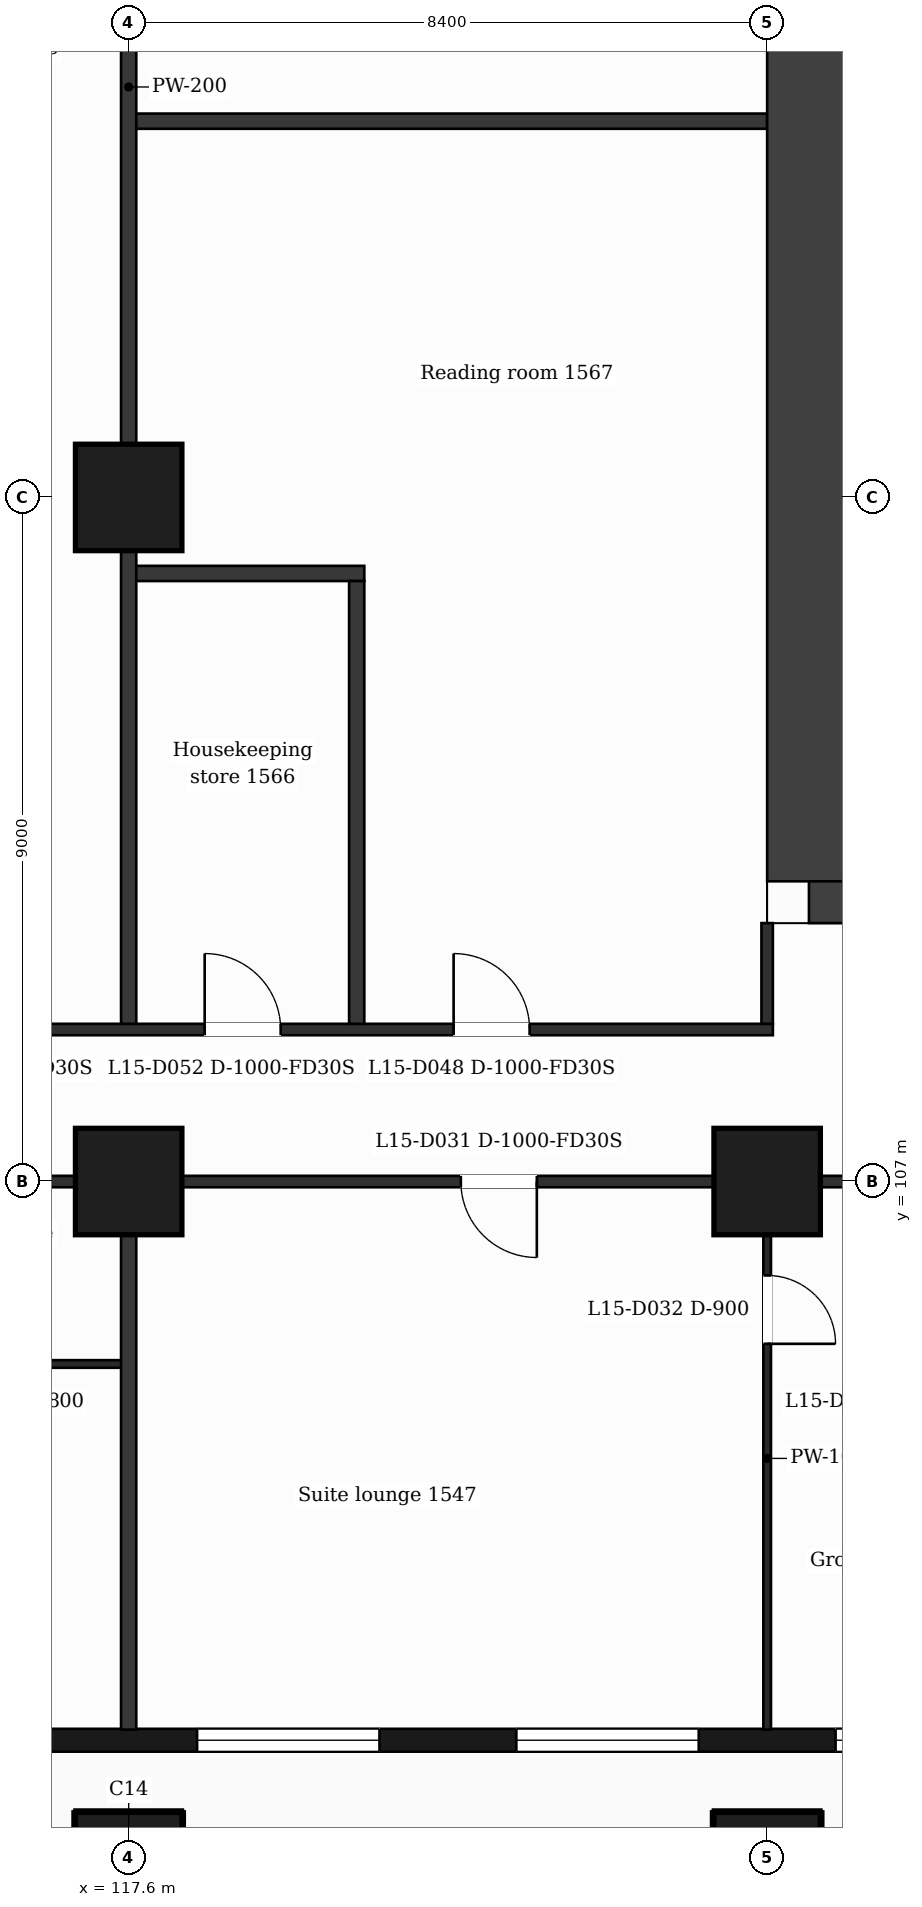
"""IFC4 building model, lengths in metres.
Left out: names, types, materials, properties, quantities, classifications, styles, units other than length and angle.
Written with IfcOpenShell. Run it as: python <this file> out.ifc"""

import sys

from ifc_helpers import new_model, si_unit, direction, frame, frame_2d, origin, origin_2d, place, context, subcontext, project, spatial, rectangle, extrude, element, fill, save


model = new_model("IFC4")
c1 = context("Model", 3, precision=1e-05, world=origin(), true_north=direction((0.0, 1.0)))
c2 = subcontext(c1, "Body", "Model", "MODEL_VIEW")
j1 = project(units=[si_unit("LENGTHUNIT", "METRE"), si_unit("PLANEANGLEUNIT", "RADIAN")], contexts=[c1])
p1 = place(None, origin())
s1 = spatial("IfcSite", under=j1, at=p1, CompositionType="ELEMENT")
p2 = place(p1, origin())
s2 = spatial("IfcBuilding", under=s1, at=p2, CompositionType="ELEMENT")
p3 = place(p2, frame((0.0, 0.0, 70.5)))
s3 = spatial("IfcBuildingStorey", under=s2, at=p3, CompositionType="ELEMENT", Elevation=70.5)
p4 = place(p3, frame((140.502, 110.95, 0.0), z_axis=(0.0, 0.0, 1.0), x_axis=(-1.0, 0.0, 0.0)))
e1 = element("IfcWall", 1, at=p4, inside=s3, PredefinedType="SHEAR", context=c2, shape_type="SweptSolid", body=[
    extrude(rectangle(XDim=13.952, YDim=1.1, at=frame_2d((6.976, 0.0))), origin(), (0.0, 0.0, 1.0), 3.5),
])
p5 = place(p4, frame((6.804, 0.0, 0.0)))
e2 = element("IfcOpeningElement", 2, at=p5, cuts=e1, PredefinedType="OPENING", context=c2, shape_type="SweptSolid", body=[
    extrude(rectangle(XDim=1.4, YDim=2.1, at=frame_2d((0.7, 1.05))), frame((0.0, 0.56, 0.0), z_axis=(0.0, -1.0, 0.0), x_axis=(1.0, 0.0, 0.0)), (0.0, 0.0, 1.0), 1.12),
])
p6 = place(p3, frame((126.55, 110.95, 0.0), z_axis=(0.0, 0.0, 1.0), x_axis=(0.0, 1.0, 0.0)))
e3 = element("IfcWall", 3, at=p6, inside=s3, PredefinedType="SHEAR", context=c2, shape_type="SweptSolid", body=[
    extrude(rectangle(XDim=20.9, YDim=1.1, at=frame_2d((10.45, 0.0))), origin(), (0.0, 0.0, 1.0), 3.5),
])
for number, where, z_axis, x_axis in (
    (4, (117.6, 98.0, 0.0), (0.0, 0.0, 1.0), (1.0, 0.0, 0.0)),
    (5, (126.0, 98.0, 0.0), (0.0, 0.0, 1.0), (1.0, 0.0, 0.0)),
    (6, (117.6, 107.0, 0.0), (0.0, 0.0, 1.0), (1.0, 0.0, 0.0)),
    (7, (126.0, 107.0, 0.0), (0.0, 0.0, 1.0), (1.0, 0.0, 0.0)),
    (8, (117.6, 116.0, 0.0), (0.0, 0.0, 1.0), (1.0, 0.0, 0.0)),
):
    element("IfcColumn", number, at=place(p3, frame(where, z_axis=z_axis, x_axis=x_axis)), inside=s3, PredefinedType="COLUMN", context=c2, shape_type="SweptSolid", body=[
        extrude(rectangle(XDim=1.4, YDim=1.4, at=origin_2d()), origin(), (0.0, 0.0, 1.0), 3.5),
    ])
p7 = place(p3, frame((89.85, 99.65, 0.0), z_axis=(0.0, 0.0, 1.0), x_axis=(1.0, 0.0, 0.0)))
e9 = element("IfcWall", 9, at=p7, inside=s3, PredefinedType="SOLIDWALL", context=c2, shape_type="SweptSolid", body=[
    extrude(rectangle(XDim=47.25, YDim=0.3, at=frame_2d((23.625, 0.0))), origin(), (0.0, 0.0, 1.0), 3.18),
])
p8 = place(p7, frame((0.725, 0.0, 0.9)))
e10 = element("IfcOpeningElement", 10, at=p8, cuts=e9, PredefinedType="OPENING", context=c2, shape_type="SweptSolid", body=[
    extrude(rectangle(XDim=1.2, YDim=2.1, at=frame_2d((0.6, 1.05))), frame((0.0, 0.16, 0.0), z_axis=(0.0, -1.0, 0.0), x_axis=(1.0, 0.0, 0.0)), (0.0, 0.0, 1.0), 0.32),
])
p9 = place(p7, frame((3.45, 0.0, 0.9)))
e11 = element("IfcOpeningElement", 11, at=p9, cuts=e9, PredefinedType="OPENING", context=c2, shape_type="SweptSolid", body=[
    extrude(rectangle(XDim=2.4, YDim=2.1, at=frame_2d((1.2, 1.05))), frame((0.0, 0.16, 0.0), z_axis=(0.0, -1.0, 0.0), x_axis=(1.0, 0.0, 0.0)), (0.0, 0.0, 1.0), 0.32),
])
p10 = place(p7, frame((7.35, 0.0, 0.0)))
e12 = element("IfcOpeningElement", 12, at=p10, cuts=e9, PredefinedType="OPENING", context=c2, shape_type="SweptSolid", body=[
    extrude(rectangle(XDim=1.2, YDim=2.4, at=frame_2d((0.6, 1.2))), frame((0.0, 0.16, 0.0), z_axis=(0.0, -1.0, 0.0), x_axis=(1.0, 0.0, 0.0)), (0.0, 0.0, 1.0), 0.32),
])
p11 = place(p7, frame((9.15, 0.0, 0.9)))
e13 = element("IfcOpeningElement", 13, at=p11, cuts=e9, PredefinedType="OPENING", context=c2, shape_type="SweptSolid", body=[
    extrude(rectangle(XDim=1.2, YDim=2.1, at=frame_2d((0.6, 1.05))), frame((0.0, 0.16, 0.0), z_axis=(0.0, -1.0, 0.0), x_axis=(1.0, 0.0, 0.0)), (0.0, 0.0, 1.0), 0.32),
])
p12 = place(p7, frame((11.85, 0.0, 0.9)))
e14 = element("IfcOpeningElement", 14, at=p12, cuts=e9, PredefinedType="OPENING", context=c2, shape_type="SweptSolid", body=[
    extrude(rectangle(XDim=2.4, YDim=2.1, at=frame_2d((1.2, 1.05))), frame((0.0, 0.16, 0.0), z_axis=(0.0, -1.0, 0.0), x_axis=(1.0, 0.0, 0.0)), (0.0, 0.0, 1.0), 0.32),
])
p13 = place(p7, frame((16.05, 0.0, 0.9)))
e15 = element("IfcOpeningElement", 15, at=p13, cuts=e9, PredefinedType="OPENING", context=c2, shape_type="SweptSolid", body=[
    extrude(rectangle(XDim=2.4, YDim=2.1, at=frame_2d((1.2, 1.05))), frame((0.0, 0.16, 0.0), z_axis=(0.0, -1.0, 0.0), x_axis=(1.0, 0.0, 0.0)), (0.0, 0.0, 1.0), 0.32),
])
p14 = place(p7, frame((20.85, 0.0, 0.9)))
e16 = element("IfcOpeningElement", 16, at=p14, cuts=e9, PredefinedType="OPENING", context=c2, shape_type="SweptSolid", body=[
    extrude(rectangle(XDim=1.2, YDim=2.1, at=frame_2d((0.6, 1.05))), frame((0.0, 0.16, 0.0), z_axis=(0.0, -1.0, 0.0), x_axis=(1.0, 0.0, 0.0)), (0.0, 0.0, 1.0), 0.32),
])
p15 = place(p7, frame((25.05, 0.0, 0.9)))
e17 = element("IfcOpeningElement", 17, at=p15, cuts=e9, PredefinedType="OPENING", context=c2, shape_type="SweptSolid", body=[
    extrude(rectangle(XDim=1.2, YDim=2.1, at=frame_2d((0.6, 1.05))), frame((0.0, 0.16, 0.0), z_axis=(0.0, -1.0, 0.0), x_axis=(1.0, 0.0, 0.0)), (0.0, 0.0, 1.0), 0.32),
])
p16 = place(p7, frame((28.65, 0.0, 0.9)))
e18 = element("IfcOpeningElement", 18, at=p16, cuts=e9, PredefinedType="OPENING", context=c2, shape_type="SweptSolid", body=[
    extrude(rectangle(XDim=2.4, YDim=2.1, at=frame_2d((1.2, 1.05))), frame((0.0, 0.16, 0.0), z_axis=(0.0, -1.0, 0.0), x_axis=(1.0, 0.0, 0.0)), (0.0, 0.0, 1.0), 0.32),
])
p17 = place(p7, frame((32.85, 0.0, 0.9)))
e19 = element("IfcOpeningElement", 19, at=p17, cuts=e9, PredefinedType="OPENING", context=c2, shape_type="SweptSolid", body=[
    extrude(rectangle(XDim=2.4, YDim=2.1, at=frame_2d((1.2, 1.05))), frame((0.0, 0.16, 0.0), z_axis=(0.0, -1.0, 0.0), x_axis=(1.0, 0.0, 0.0)), (0.0, 0.0, 1.0), 0.32),
])
p18 = place(p7, frame((37.05, 0.0, 0.9)))
e20 = element("IfcOpeningElement", 20, at=p18, cuts=e9, PredefinedType="OPENING", context=c2, shape_type="SweptSolid", body=[
    extrude(rectangle(XDim=2.4, YDim=2.1, at=frame_2d((1.2, 1.05))), frame((0.0, 0.16, 0.0), z_axis=(0.0, -1.0, 0.0), x_axis=(1.0, 0.0, 0.0)), (0.0, 0.0, 1.0), 0.32),
])
p19 = place(p7, frame((41.25, 0.0, 0.9)))
e21 = element("IfcOpeningElement", 21, at=p19, cuts=e9, PredefinedType="OPENING", context=c2, shape_type="SweptSolid", body=[
    extrude(rectangle(XDim=2.4, YDim=2.1, at=frame_2d((1.2, 1.05))), frame((0.0, 0.16, 0.0), z_axis=(0.0, -1.0, 0.0), x_axis=(1.0, 0.0, 0.0)), (0.0, 0.0, 1.0), 0.32),
])
p20 = place(p7, frame((45.25, 0.0, 0.9)))
e22 = element("IfcOpeningElement", 22, at=p20, cuts=e9, PredefinedType="OPENING", context=c2, shape_type="SweptSolid", body=[
    extrude(rectangle(XDim=1.2, YDim=2.1, at=frame_2d((0.6, 1.05))), frame((0.0, 0.16, 0.0), z_axis=(0.0, -1.0, 0.0), x_axis=(1.0, 0.0, 0.0)), (0.0, 0.0, 1.0), 0.32),
])
p21 = place(p3, frame((114.85, 104.6, 0.0), z_axis=(0.0, 0.0, 1.0), x_axis=(1.0, 0.0, 0.0)))
e23 = element("IfcWall", 23, at=p21, inside=s3, PredefinedType="PARTITIONING", context=c2, shape_type="SweptSolid", body=[
    extrude(rectangle(XDim=2.75, YDim=0.1, at=frame_2d((1.375, 0.0))), origin(), (0.0, 0.0, 1.0), 3.18),
])
p22 = place(p21, frame((0.7, 0.0, 0.0)))
e24 = element("IfcOpeningElement", 24, at=p22, cuts=e23, PredefinedType="OPENING", context=c2, shape_type="SweptSolid", body=[
    extrude(rectangle(XDim=0.8, YDim=2.1, at=frame_2d((0.4, 1.05))), frame((0.0, 0.06, 0.0), z_axis=(0.0, -1.0, 0.0), x_axis=(1.0, 0.0, 0.0)), (0.0, 0.0, 1.0), 0.12),
])
p23 = place(p3, frame((87.018, 107.0, 0.0), z_axis=(0.0, 0.0, 1.0), x_axis=(1.0, 0.0, 0.0)))
e25 = element("IfcWall", 25, at=p23, inside=s3, PredefinedType="PARTITIONING", context=c2, shape_type="SweptSolid", body=[
    extrude(rectangle(XDim=52.765, YDim=0.15, at=frame_2d((26.382, 0.0))), origin(), (0.0, 0.0, 1.0), 3.18),
])
p24 = place(p23, frame((0.87, 0.0, 0.0)))
e26 = element("IfcOpeningElement", 26, at=p24, cuts=e25, PredefinedType="OPENING", context=c2, shape_type="SweptSolid", body=[
    extrude(rectangle(XDim=0.95, YDim=2.1, at=frame_2d((0.475, 1.05))), frame((0.0, 0.085, 0.0), z_axis=(0.0, -1.0, 0.0), x_axis=(1.0, 0.0, 0.0)), (0.0, 0.0, 1.0), 0.17),
])
p25 = place(p23, frame((6.332, 0.0, 0.0)))
e27 = element("IfcOpeningElement", 27, at=p25, cuts=e25, PredefinedType="OPENING", context=c2, shape_type="SweptSolid", body=[
    extrude(rectangle(XDim=0.95, YDim=2.1, at=frame_2d((0.475, 1.05))), frame((0.0, 0.085, 0.0), z_axis=(0.0, -1.0, 0.0), x_axis=(1.0, 0.0, 0.0)), (0.0, 0.0, 1.0), 0.17),
])
p26 = place(p23, frame((11.882, 0.0, 0.0)))
e28 = element("IfcOpeningElement", 28, at=p26, cuts=e25, PredefinedType="OPENING", context=c2, shape_type="SweptSolid", body=[
    extrude(rectangle(XDim=0.95, YDim=2.1, at=frame_2d((0.475, 1.05))), frame((0.0, 0.085, 0.0), z_axis=(0.0, -1.0, 0.0), x_axis=(1.0, 0.0, 0.0)), (0.0, 0.0, 1.0), 0.17),
])
p27 = place(p23, frame((16.757, 0.0, 0.0)))
e29 = element("IfcOpeningElement", 29, at=p27, cuts=e25, PredefinedType="OPENING", context=c2, shape_type="SweptSolid", body=[
    extrude(rectangle(XDim=0.95, YDim=2.1, at=frame_2d((0.475, 1.05))), frame((0.0, 0.085, 0.0), z_axis=(0.0, -1.0, 0.0), x_axis=(1.0, 0.0, 0.0)), (0.0, 0.0, 1.0), 0.17),
])
p28 = place(p23, frame((20.319, 0.0, 0.0)))
e30 = element("IfcOpeningElement", 30, at=p28, cuts=e25, PredefinedType="OPENING", context=c2, shape_type="SweptSolid", body=[
    extrude(rectangle(XDim=0.95, YDim=2.1, at=frame_2d((0.475, 1.05))), frame((0.0, 0.085, 0.0), z_axis=(0.0, -1.0, 0.0), x_axis=(1.0, 0.0, 0.0)), (0.0, 0.0, 1.0), 0.17),
])
p29 = place(p23, frame((23.132, 0.0, 0.0)))
e31 = element("IfcOpeningElement", 31, at=p29, cuts=e25, PredefinedType="OPENING", context=c2, shape_type="SweptSolid", body=[
    extrude(rectangle(XDim=0.95, YDim=2.1, at=frame_2d((0.475, 1.05))), frame((0.0, 0.085, 0.0), z_axis=(0.0, -1.0, 0.0), x_axis=(1.0, 0.0, 0.0)), (0.0, 0.0, 1.0), 0.17),
])
p30 = place(p23, frame((26.657, 0.0, 0.0)))
e32 = element("IfcOpeningElement", 32, at=p30, cuts=e25, PredefinedType="OPENING", context=c2, shape_type="SweptSolid", body=[
    extrude(rectangle(XDim=0.95, YDim=2.1, at=frame_2d((0.475, 1.05))), frame((0.0, 0.085, 0.0), z_axis=(0.0, -1.0, 0.0), x_axis=(1.0, 0.0, 0.0)), (0.0, 0.0, 1.0), 0.17),
])
p31 = place(p23, frame((34.952, 0.0, 0.0)))
e33 = element("IfcOpeningElement", 33, at=p31, cuts=e25, PredefinedType="OPENING", context=c2, shape_type="SweptSolid", body=[
    extrude(rectangle(XDim=1.0, YDim=2.1, at=frame_2d((0.5, 1.05))), frame((0.0, 0.085, 0.0), z_axis=(0.0, -1.0, 0.0), x_axis=(1.0, 0.0, 0.0)), (0.0, 0.0, 1.0), 0.17),
])
p32 = place(p23, frame((45.062, 0.0, 0.0)))
e34 = element("IfcOpeningElement", 34, at=p32, cuts=e25, PredefinedType="OPENING", context=c2, shape_type="SweptSolid", body=[
    extrude(rectangle(XDim=0.95, YDim=2.1, at=frame_2d((0.475, 1.05))), frame((0.0, 0.085, 0.0), z_axis=(0.0, -1.0, 0.0), x_axis=(1.0, 0.0, 0.0)), (0.0, 0.0, 1.0), 0.17),
])
p33 = place(p23, frame((49.285, 0.0, 0.0)))
e35 = element("IfcOpeningElement", 35, at=p33, cuts=e25, PredefinedType="OPENING", context=c2, shape_type="SweptSolid", body=[
    extrude(rectangle(XDim=0.95, YDim=2.1, at=frame_2d((0.475, 1.05))), frame((0.0, 0.085, 0.0), z_axis=(0.0, -1.0, 0.0), x_axis=(1.0, 0.0, 0.0)), (0.0, 0.0, 1.0), 0.17),
])
p34 = place(p3, frame((100.725, 109.0, 0.0), z_axis=(0.0, 0.0, 1.0), x_axis=(1.0, 0.0, 0.0)))
e36 = element("IfcWall", 36, at=p34, inside=s3, PredefinedType="PARTITIONING", context=c2, shape_type="SweptSolid", body=[
    extrude(rectangle(XDim=25.35, YDim=0.15, at=frame_2d((12.675, 0.0))), origin(), (0.0, 0.0, 1.0), 3.18),
])
p35 = place(p34, frame((21.15, 0.0, 0.0)))
e37 = element("IfcOpeningElement", 37, at=p35, cuts=e36, PredefinedType="OPENING", context=c2, shape_type="SweptSolid", body=[
    extrude(rectangle(XDim=1.0, YDim=2.1, at=frame_2d((0.5, 1.05))), frame((0.0, 0.085, 0.0), z_axis=(0.0, -1.0, 0.0), x_axis=(1.0, 0.0, 0.0)), (0.0, 0.0, 1.0), 0.17),
])
p36 = place(p34, frame((3.105, 0.0, 0.0)))
e38 = element("IfcOpeningElement", 38, at=p36, cuts=e36, PredefinedType="OPENING", context=c2, shape_type="SweptSolid", body=[
    extrude(rectangle(XDim=1.0, YDim=2.1, at=frame_2d((0.5, 1.05))), frame((0.0, 0.085, 0.0), z_axis=(0.0, -1.0, 0.0), x_axis=(1.0, 0.0, 0.0)), (0.0, 0.0, 1.0), 0.17),
])
p37 = place(p34, frame((9.825, 0.0, 0.0)))
e39 = element("IfcOpeningElement", 39, at=p37, cuts=e36, PredefinedType="OPENING", context=c2, shape_type="SweptSolid", body=[
    extrude(rectangle(XDim=1.0, YDim=2.1, at=frame_2d((0.5, 1.05))), frame((0.0, 0.085, 0.0), z_axis=(0.0, -1.0, 0.0), x_axis=(1.0, 0.0, 0.0)), (0.0, 0.0, 1.0), 0.17),
])
p38 = place(p34, frame((14.275, 0.0, 0.0)))
e40 = element("IfcOpeningElement", 40, at=p38, cuts=e36, PredefinedType="OPENING", context=c2, shape_type="SweptSolid", body=[
    extrude(rectangle(XDim=1.0, YDim=2.1, at=frame_2d((0.5, 1.05))), frame((0.0, 0.085, 0.0), z_axis=(0.0, -1.0, 0.0), x_axis=(1.0, 0.0, 0.0)), (0.0, 0.0, 1.0), 0.17),
])
p39 = place(p34, frame((17.875, 0.0, 0.0)))
e41 = element("IfcOpeningElement", 41, at=p39, cuts=e36, PredefinedType="OPENING", context=c2, shape_type="SweptSolid", body=[
    extrude(rectangle(XDim=1.0, YDim=2.1, at=frame_2d((0.5, 1.05))), frame((0.0, 0.085, 0.0), z_axis=(0.0, -1.0, 0.0), x_axis=(1.0, 0.0, 0.0)), (0.0, 0.0, 1.0), 0.17),
])
p40 = place(p3, frame((117.6, 115.0, 0.0), z_axis=(0.0, 0.0, 1.0), x_axis=(1.0, 0.0, 0.0)))
e42 = element("IfcWall", 42, at=p40, inside=s3, PredefinedType="PARTITIONING", context=c2, shape_type="SweptSolid", body=[
    extrude(rectangle(XDim=3.1, YDim=0.2, at=frame_2d((1.55, 0.0))), origin(), (0.0, 0.0, 1.0), 3.18),
])
p41 = place(p3, frame((117.6, 120.95, 0.0), z_axis=(0.0, 0.0, 1.0), x_axis=(1.0, 0.0, 0.0)))
e43 = element("IfcWall", 43, at=p41, inside=s3, PredefinedType="PARTITIONING", context=c2, shape_type="SweptSolid", body=[
    extrude(rectangle(XDim=8.4, YDim=0.2, at=frame_2d((4.2, 0.0))), origin(), (0.0, 0.0, 1.0), 3.18),
])
p42 = place(p3, frame((117.6, 99.79, 0.0), z_axis=(0.0, 0.0, 1.0), x_axis=(0.0, 1.0, 0.0)))
e44 = element("IfcWall", 44, at=p42, inside=s3, PredefinedType="PARTITIONING", context=c2, shape_type="SweptSolid", body=[
    extrude(rectangle(XDim=7.135, YDim=0.2, at=frame_2d((3.567, 0.0))), origin(), (0.0, 0.0, 1.0), 3.18),
])
p43 = place(p3, frame((117.6, 109.075, 0.0), z_axis=(0.0, 0.0, 1.0), x_axis=(0.0, 1.0, 0.0)))
e45 = element("IfcWall", 45, at=p43, inside=s3, PredefinedType="PARTITIONING", context=c2, shape_type="SweptSolid", body=[
    extrude(rectangle(XDim=24.65, YDim=0.2, at=frame_2d((12.325, 0.0))), origin(), (0.0, 0.0, 1.0), 3.18),
])
p44 = place(p3, frame((120.6, 109.075, 0.0), z_axis=(0.0, 0.0, 1.0), x_axis=(0.0, 1.0, 0.0)))
e46 = element("IfcWall", 46, at=p44, inside=s3, PredefinedType="PARTITIONING", context=c2, shape_type="SweptSolid", body=[
    extrude(rectangle(XDim=5.825, YDim=0.2, at=frame_2d((2.913, 0.0))), origin(), (0.0, 0.0, 1.0), 3.18),
])
p45 = place(p3, frame((126.0, 99.79, 0.0), z_axis=(0.0, 0.0, 1.0), x_axis=(0.0, 1.0, 0.0)))
e47 = element("IfcWall", 47, at=p45, inside=s3, PredefinedType="PARTITIONING", context=c2, shape_type="SweptSolid", body=[
    extrude(rectangle(XDim=7.135, YDim=0.1, at=frame_2d((3.567, 0.0))), origin(), (0.0, 0.0, 1.0), 3.18),
])
p46 = place(p45, frame((5.075, 0.0, 0.0)))
e48 = element("IfcOpeningElement", 48, at=p46, cuts=e47, PredefinedType="OPENING", context=c2, shape_type="SweptSolid", body=[
    extrude(rectangle(XDim=0.9, YDim=2.1, at=frame_2d((0.45, 1.05))), frame((0.0, 0.06, 0.0), z_axis=(0.0, -1.0, 0.0), x_axis=(1.0, 0.0, 0.0)), (0.0, 0.0, 1.0), 0.12),
])
p47 = place(p3, frame((126.0, 109.075, 0.0), z_axis=(0.0, 0.0, 1.0), x_axis=(0.0, 1.0, 0.0)))
e49 = element("IfcWall", 49, at=p47, inside=s3, PredefinedType="PARTITIONING", context=c2, shape_type="SweptSolid", body=[
    extrude(rectangle(XDim=1.325, YDim=0.15, at=frame_2d((0.663, 0.0))), origin(), (0.0, 0.0, 1.0), 3.18),
])
p48 = place(p16, origin())
e50 = element("IfcWindow", 50, at=p48, inside=s3, PartitioningType="SINGLE_PANEL", PredefinedType="WINDOW", context=c2, shape_type="SweptSolid", body=[
    extrude(rectangle(XDim=2.4, YDim=2.1, at=frame_2d((1.2, 1.05))), frame((0.0, 0.03, 0.0), z_axis=(0.0, -1.0, 0.0), x_axis=(1.0, 0.0, 0.0)), (0.0, 0.0, 1.0), 0.06),
])
fill(e18, e50)
p49 = place(p17, origin())
e51 = element("IfcWindow", 51, at=p49, inside=s3, PartitioningType="SINGLE_PANEL", PredefinedType="WINDOW", context=c2, shape_type="SweptSolid", body=[
    extrude(rectangle(XDim=2.4, YDim=2.1, at=frame_2d((1.2, 1.05))), frame((0.0, 0.03, 0.0), z_axis=(0.0, -1.0, 0.0), x_axis=(1.0, 0.0, 0.0)), (0.0, 0.0, 1.0), 0.06),
])
fill(e19, e51)
p50 = place(p18, origin())
e52 = element("IfcWindow", 52, at=p50, inside=s3, PartitioningType="SINGLE_PANEL", PredefinedType="WINDOW", context=c2, shape_type="SweptSolid", body=[
    extrude(rectangle(XDim=2.4, YDim=2.1, at=frame_2d((1.2, 1.05))), frame((0.0, 0.03, 0.0), z_axis=(0.0, -1.0, 0.0), x_axis=(1.0, 0.0, 0.0)), (0.0, 0.0, 1.0), 0.06),
])
fill(e20, e52)
p51 = place(p31, origin())
e53 = element("IfcDoor", 53, at=p51, inside=s3, OperationType="SINGLE_SWING_RIGHT", PredefinedType="DOOR", context=c2, shape_type="SweptSolid", body=[
    extrude(rectangle(XDim=1.0, YDim=2.1, at=frame_2d((0.5, 1.05))), frame((0.0, 0.025, 0.0), z_axis=(0.0, -1.0, 0.0), x_axis=(1.0, 0.0, 0.0)), (0.0, 0.0, 1.0), 0.05),
])
fill(e33, e53)
p52 = place(p46, origin())
e54 = element("IfcDoor", 54, at=p52, inside=s3, OperationType="SINGLE_SWING_LEFT", PredefinedType="DOOR", context=c2, shape_type="SweptSolid", body=[
    extrude(rectangle(XDim=0.9, YDim=2.1, at=frame_2d((0.45, 1.05))), frame((0.0, 0.025, 0.0), z_axis=(0.0, -1.0, 0.0), x_axis=(1.0, 0.0, 0.0)), (0.0, 0.0, 1.0), 0.05),
])
fill(e48, e54)
p53 = place(p35, origin())
e55 = element("IfcDoor", 55, at=p53, inside=s3, OperationType="SINGLE_SWING_LEFT", PredefinedType="DOOR", context=c2, shape_type="SweptSolid", body=[
    extrude(rectangle(XDim=1.0, YDim=2.1, at=frame_2d((0.5, 1.05))), frame((0.0, 0.025, 0.0), z_axis=(0.0, -1.0, 0.0), x_axis=(1.0, 0.0, 0.0)), (0.0, 0.0, 1.0), 0.05),
])
fill(e37, e55)
p54 = place(p39, origin())
e56 = element("IfcDoor", 56, at=p54, inside=s3, OperationType="SINGLE_SWING_LEFT", PredefinedType="DOOR", context=c2, shape_type="SweptSolid", body=[
    extrude(rectangle(XDim=1.0, YDim=2.1, at=frame_2d((0.5, 1.05))), frame((0.0, 0.025, 0.0), z_axis=(0.0, -1.0, 0.0), x_axis=(1.0, 0.0, 0.0)), (0.0, 0.0, 1.0), 0.05),
])
fill(e41, e56)
save(model, sys.argv[1])
